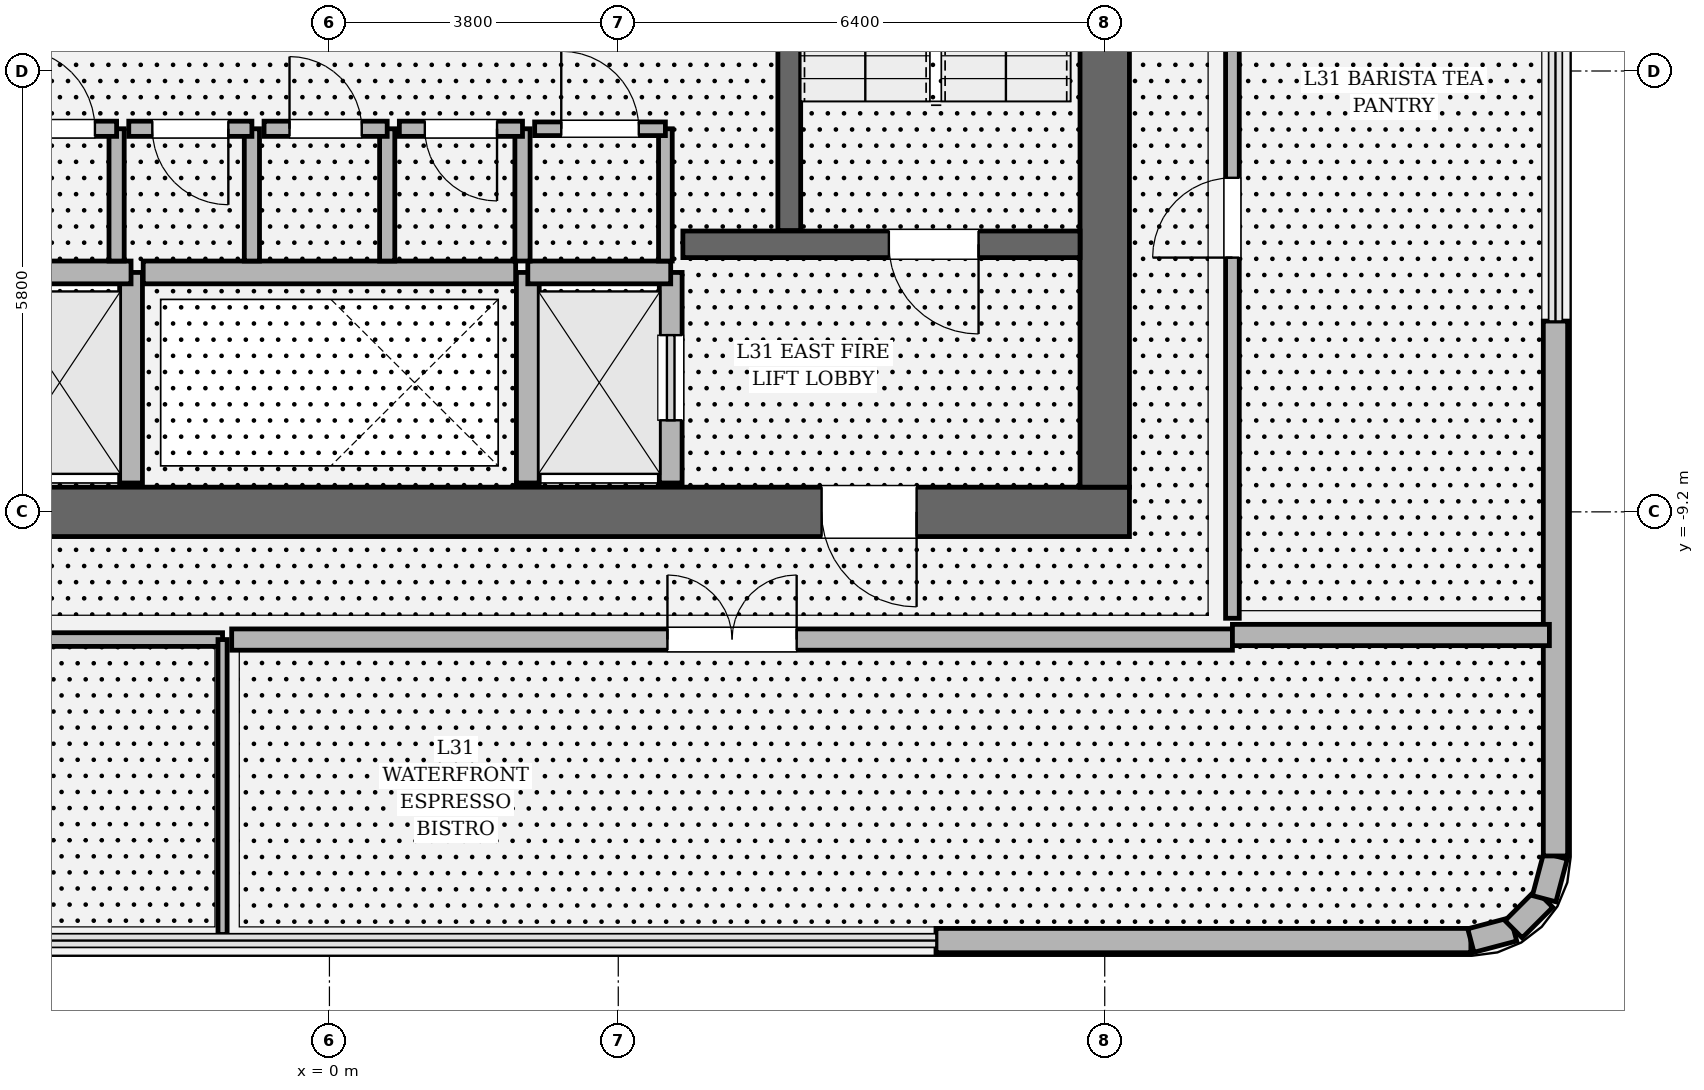
"""IFC4 building model, lengths in metres.
Left out: names, types, materials, properties, quantities, classifications, styles, units other than length and angle.
Written with IfcOpenShell. Run it as: python <this file> out.ifc"""

import sys

from ifc_helpers import new_model, si_unit, direction, frame, frame_2d, origin, place, context, subcontext, project, spatial, rectangle, extrude, element, fill, save


model = new_model("IFC4")
c1 = context("Model", 3, precision=1e-05, world=origin(), true_north=direction((0.0, 1.0)))
c2 = subcontext(c1, "Body", "Model", "MODEL_VIEW")
j1 = project(units=[si_unit("LENGTHUNIT", "METRE"), si_unit("PLANEANGLEUNIT", "RADIAN")], contexts=[c1])
p1 = place(None, origin())
s1 = spatial("IfcSite", under=j1, at=p1, CompositionType="ELEMENT")
p2 = place(p1, origin())
s2 = spatial("IfcBuilding", under=s1, at=p2, CompositionType="ELEMENT")
p3 = place(p2, frame((0.0, 0.0, 135.0)))
s3 = spatial("IfcBuildingStorey", under=s2, at=p3, CompositionType="ELEMENT", Elevation=135.0)
p4 = place(p3, frame((10.525, -9.2, 0.0), z_axis=(0.0, 0.0, 1.0), x_axis=(-1.0, 0.0, 0.0)))
e1 = element("IfcWall", 1, at=p4, inside=s3, PredefinedType="SHEAR", context=c2, shape_type="SweptSolid", body=[
    extrude(rectangle(XDim=21.05, YDim=0.65, at=frame_2d((10.525, 0.0))), origin(), (0.0, 0.0, 1.0), 4.8),
])
p5 = place(p4, frame((2.8, 0.0, 0.0)))
e2 = element("IfcOpeningElement", 2, at=p5, cuts=e1, PredefinedType="OPENING", context=c2, shape_type="SweptSolid", body=[
    extrude(rectangle(XDim=1.25, YDim=2.25, at=frame_2d((0.625, 1.125))), frame((0.0, 0.335, 0.0), z_axis=(0.0, -1.0, 0.0), x_axis=(1.0, 0.0, 0.0)), (0.0, 0.0, 1.0), 0.67),
])
p6 = place(p4, frame((17.0, 0.0, 0.0)))
e3 = element("IfcOpeningElement", 3, at=p6, cuts=e1, PredefinedType="OPENING", context=c2, shape_type="SweptSolid", body=[
    extrude(rectangle(XDim=1.25, YDim=2.25, at=frame_2d((0.625, 1.125))), frame((0.0, 0.335, 0.0), z_axis=(0.0, -1.0, 0.0), x_axis=(1.0, 0.0, 0.0)), (0.0, 0.0, 1.0), 0.67),
])
p7 = place(p3, frame((10.2, 8.875, 0.0), z_axis=(0.0, 0.0, 1.0), x_axis=(0.0, -1.0, 0.0)))
e4 = element("IfcWall", 4, at=p7, inside=s3, PredefinedType="SHEAR", context=c2, shape_type="SweptSolid", body=[
    extrude(rectangle(XDim=17.75, YDim=0.65, at=frame_2d((8.875, 0.0))), origin(), (0.0, 0.0, 1.0), 4.8),
])
p8 = place(p7, frame((3.905, 0.0, 0.0)))
e5 = element("IfcOpeningElement", 5, at=p8, cuts=e4, PredefinedType="OPENING", context=c2, shape_type="SweptSolid", body=[
    extrude(rectangle(XDim=1.18, YDim=2.2, at=frame_2d((0.59, 1.1))), frame((0.0, 0.335, 0.0), z_axis=(0.0, -1.0, 0.0), x_axis=(1.0, 0.0, 0.0)), (0.0, 0.0, 1.0), 0.67),
])
p9 = place(p3, frame((6.05, 3.45, 0.0), z_axis=(0.0, 0.0, 1.0), x_axis=(0.0, -1.0, 0.0)))
e6 = element("IfcWall", 6, at=p9, inside=s3, PredefinedType="SOLIDWALL", context=c2, shape_type="SweptSolid", body=[
    extrude(rectangle(XDim=8.95, YDim=0.3, at=frame_2d((4.475, 0.0))), origin(), (0.0, 0.0, 1.0), 4.8),
])
p10 = place(p3, frame((4.65, -5.68, 0.0), z_axis=(0.0, 0.0, 1.0), x_axis=(1.0, 0.0, 0.0)))
e7 = element("IfcWall", 7, at=p10, inside=s3, PredefinedType="SOLIDWALL", context=c2, shape_type="SweptSolid", body=[
    extrude(rectangle(XDim=5.225, YDim=0.35, at=frame_2d((2.613, 0.0))), origin(), (0.0, 0.0, 1.0), 4.8),
])
p11 = place(p10, frame((2.71, 0.0, 0.0)))
e8 = element("IfcOpeningElement", 8, at=p11, cuts=e7, PredefinedType="OPENING", context=c2, shape_type="SweptSolid", body=[
    extrude(rectangle(XDim=1.18, YDim=2.2, at=frame_2d((0.59, 1.1))), frame((0.0, 0.185, 0.0), z_axis=(0.0, -1.0, 0.0), x_axis=(1.0, 0.0, 0.0)), (0.0, 0.0, 1.0), 0.37),
])
p12 = place(p3, frame((7.98, -14.84, 0.0), z_axis=(0.0, 0.0, 1.0), x_axis=(1.0, 0.0, 0.0)))
e9 = element("IfcWall", 9, at=p12, inside=s3, PredefinedType="SOLIDWALL", context=c2, shape_type="SweptSolid", body=[
    extrude(rectangle(XDim=7.037, YDim=0.32, at=frame_2d((3.519, 0.0))), origin(), (0.0, 0.0, 1.0), 3.194),
])
p13 = place(p3, frame((15.017, -14.84, 0.0), z_axis=(0.0, 0.0, 1.0), x_axis=(0.966665515501, 0.256042537758, 0.0)))
e10 = element("IfcWall", 10, at=p13, inside=s3, PredefinedType="SOLIDWALL", context=c2, shape_type="SweptSolid", body=[
    extrude(rectangle(XDim=0.582, YDim=0.32, at=frame_2d((0.291, 0.0))), origin(), (0.0, 0.0, 1.0), 4.52),
])
p14 = place(p3, frame((15.579, -14.691, 0.0), z_axis=(0.0, 0.0, 1.0), x_axis=(0.707106781187, 0.707106781187, 0.0)))
e11 = element("IfcWall", 11, at=p14, inside=s3, PredefinedType="SOLIDWALL", context=c2, shape_type="SweptSolid", body=[
    extrude(rectangle(XDim=0.569, YDim=0.32, at=frame_2d((0.284, 0.0))), origin(), (0.0, 0.0, 1.0), 4.52),
])
p15 = place(p3, frame((15.981, -14.289, 0.0), z_axis=(0.0, 0.0, 1.0), x_axis=(0.255650250031, 0.966769336325, 0.0)))
e12 = element("IfcWall", 12, at=p15, inside=s3, PredefinedType="SOLIDWALL", context=c2, shape_type="SweptSolid", body=[
    extrude(rectangle(XDim=0.582, YDim=0.32, at=frame_2d((0.291, 0.0))), origin(), (0.0, 0.0, 1.0), 4.52),
])
p16 = place(p3, frame((16.13, -13.727, 0.0), z_axis=(0.0, 0.0, 1.0), x_axis=(0.0, 1.0, 0.0)))
e13 = element("IfcWall", 13, at=p16, inside=s3, PredefinedType="SOLIDWALL", context=c2, shape_type="SweptSolid", body=[
    extrude(rectangle(XDim=7.037, YDim=0.32, at=frame_2d((3.519, 0.0))), origin(), (0.0, 0.0, 1.0), 3.194),
])
p17 = place(p3, frame((-2.61, -8.82, 0.0), z_axis=(0.0, 0.0, 1.0), x_axis=(0.0, 1.0, 0.0)))
e14 = element("IfcWall", 14, at=p17, inside=s3, PredefinedType="SOLIDWALL", context=c2, shape_type="SweptSolid", body=[
    extrude(rectangle(XDim=2.77, YDim=0.3, at=frame_2d((1.385, 0.0))), origin(), (0.0, 0.0, 1.0), 4.52),
])
p18 = place(p3, frame((-4.49, -6.05, 0.0), z_axis=(0.0, 0.0, 1.0), x_axis=(1.0, 0.0, 0.0)))
e15 = element("IfcWall", 15, at=p18, inside=s3, PredefinedType="SOLIDWALL", context=c2, shape_type="SweptSolid", body=[
    extrude(rectangle(XDim=1.88, YDim=0.3, at=frame_2d((0.94, 0.0))), origin(), (0.0, 0.0, 1.0), 4.52),
])
p19 = place(p3, frame((4.49, -8.82, 0.0), z_axis=(0.0, 0.0, 1.0), x_axis=(0.0, 1.0, 0.0)))
e16 = element("IfcWall", 16, at=p19, inside=s3, PredefinedType="SOLIDWALL", context=c2, shape_type="SweptSolid", body=[
    extrude(rectangle(XDim=2.77, YDim=0.3, at=frame_2d((1.385, 0.0))), origin(), (0.0, 0.0, 1.0), 4.52),
])
p20 = place(p19, frame((0.825, 0.0, 0.0)))
e17 = element("IfcOpeningElement", 17, at=p20, cuts=e16, PredefinedType="OPENING", context=c2, shape_type="SweptSolid", body=[
    extrude(rectangle(XDim=1.12, YDim=2.25, at=frame_2d((0.56, 1.125))), frame((0.0, 0.16, 0.0), z_axis=(0.0, -1.0, 0.0), x_axis=(1.0, 0.0, 0.0)), (0.0, 0.0, 1.0), 0.32),
])
p21 = place(p3, frame((2.61, -8.82, 0.0), z_axis=(0.0, 0.0, 1.0), x_axis=(0.0, 1.0, 0.0)))
e18 = element("IfcWall", 18, at=p21, inside=s3, PredefinedType="SOLIDWALL", context=c2, shape_type="SweptSolid", body=[
    extrude(rectangle(XDim=2.77, YDim=0.3, at=frame_2d((1.385, 0.0))), origin(), (0.0, 0.0, 1.0), 4.52),
])
p22 = place(p3, frame((2.61, -6.05, 0.0), z_axis=(0.0, 0.0, 1.0), x_axis=(1.0, 0.0, 0.0)))
e19 = element("IfcWall", 19, at=p22, inside=s3, PredefinedType="SOLIDWALL", context=c2, shape_type="SweptSolid", body=[
    extrude(rectangle(XDim=1.88, YDim=0.3, at=frame_2d((0.94, 0.0))), origin(), (0.0, 0.0, 1.0), 4.52),
])
p23 = place(p3, frame((-2.45, -6.05, 0.0), z_axis=(0.0, 0.0, 1.0), x_axis=(1.0, 0.0, 0.0)))
e20 = element("IfcWall", 20, at=p23, inside=s3, PredefinedType="SOLIDWALL", context=c2, shape_type="SweptSolid", body=[
    extrude(rectangle(XDim=4.9, YDim=0.3, at=frame_2d((2.45, 0.0))), origin(), (0.0, 0.0, 1.0), 4.52),
])
p24 = place(p3, frame((-2.8, -5.9, 0.0), z_axis=(0.0, 0.0, 1.0), x_axis=(0.0, 1.0, 0.0)))
e21 = element("IfcWall", 21, at=p24, inside=s3, PredefinedType="SOLIDWALL", context=c2, shape_type="SweptSolid", body=[
    extrude(rectangle(XDim=1.74, YDim=0.2, at=frame_2d((0.87, 0.0))), origin(), (0.0, 0.0, 1.0), 4.52),
])
p25 = place(p3, frame((-2.8, -4.16, 0.0), z_axis=(0.0, 0.0, 1.0), x_axis=(-1.0, 0.0, 0.0)))
e22 = element("IfcWall", 22, at=p25, inside=s3, PredefinedType="SOLIDWALL", context=c2, shape_type="SweptSolid", body=[
    extrude(rectangle(XDim=1.62, YDim=0.2, at=frame_2d((0.81, 0.0))), origin(), (0.0, 0.0, 1.0), 4.52),
])
p26 = place(p25, frame((0.285, 0.0, 0.0)))
e23 = element("IfcOpeningElement", 23, at=p26, cuts=e22, PredefinedType="OPENING", context=c2, shape_type="SweptSolid", body=[
    extrude(rectangle(XDim=1.05, YDim=2.2, at=frame_2d((0.525, 1.1))), frame((0.0, 0.11, 0.0), z_axis=(0.0, -1.0, 0.0), x_axis=(1.0, 0.0, 0.0)), (0.0, 0.0, 1.0), 0.22),
])
p27 = place(p3, frame((-1.02, -5.9, 0.0), z_axis=(0.0, 0.0, 1.0), x_axis=(0.0, 1.0, 0.0)))
e24 = element("IfcWall", 24, at=p27, inside=s3, PredefinedType="SOLIDWALL", context=c2, shape_type="SweptSolid", body=[
    extrude(rectangle(XDim=1.74, YDim=0.2, at=frame_2d((0.87, 0.0))), origin(), (0.0, 0.0, 1.0), 4.52),
])
p28 = place(p3, frame((-1.02, -4.16, 0.0), z_axis=(0.0, 0.0, 1.0), x_axis=(-1.0, 0.0, 0.0)))
e25 = element("IfcWall", 25, at=p28, inside=s3, PredefinedType="SOLIDWALL", context=c2, shape_type="SweptSolid", body=[
    extrude(rectangle(XDim=1.62, YDim=0.2, at=frame_2d((0.81, 0.0))), origin(), (0.0, 0.0, 1.0), 4.52),
])
p29 = place(p28, frame((0.31, 0.0, 0.0)))
e26 = element("IfcOpeningElement", 26, at=p29, cuts=e25, PredefinedType="OPENING", context=c2, shape_type="SweptSolid", body=[
    extrude(rectangle(XDim=1.0, YDim=2.15, at=frame_2d((0.5, 1.075))), frame((0.0, 0.11, 0.0), z_axis=(0.0, -1.0, 0.0), x_axis=(1.0, 0.0, 0.0)), (0.0, 0.0, 1.0), 0.22),
])
p30 = place(p3, frame((0.76, -5.9, 0.0), z_axis=(0.0, 0.0, 1.0), x_axis=(0.0, 1.0, 0.0)))
e27 = element("IfcWall", 27, at=p30, inside=s3, PredefinedType="SOLIDWALL", context=c2, shape_type="SweptSolid", body=[
    extrude(rectangle(XDim=1.74, YDim=0.2, at=frame_2d((0.87, 0.0))), origin(), (0.0, 0.0, 1.0), 4.52),
])
p31 = place(p3, frame((0.76, -4.16, 0.0), z_axis=(0.0, 0.0, 1.0), x_axis=(-1.0, 0.0, 0.0)))
e28 = element("IfcWall", 28, at=p31, inside=s3, PredefinedType="SOLIDWALL", context=c2, shape_type="SweptSolid", body=[
    extrude(rectangle(XDim=1.62, YDim=0.2, at=frame_2d((0.81, 0.0))), origin(), (0.0, 0.0, 1.0), 4.52),
])
p32 = place(p31, frame((0.335, 0.0, 0.0)))
e29 = element("IfcOpeningElement", 29, at=p32, cuts=e28, PredefinedType="OPENING", context=c2, shape_type="SweptSolid", body=[
    extrude(rectangle(XDim=0.95, YDim=2.15, at=frame_2d((0.475, 1.075))), frame((0.0, 0.11, 0.0), z_axis=(0.0, -1.0, 0.0), x_axis=(1.0, 0.0, 0.0)), (0.0, 0.0, 1.0), 0.22),
])
p33 = place(p3, frame((2.54, -5.9, 0.0), z_axis=(0.0, 0.0, 1.0), x_axis=(0.0, 1.0, 0.0)))
e30 = element("IfcWall", 30, at=p33, inside=s3, PredefinedType="SOLIDWALL", context=c2, shape_type="SweptSolid", body=[
    extrude(rectangle(XDim=1.74, YDim=0.2, at=frame_2d((0.87, 0.0))), origin(), (0.0, 0.0, 1.0), 4.52),
])
p34 = place(p3, frame((2.54, -4.16, 0.0), z_axis=(0.0, 0.0, 1.0), x_axis=(-1.0, 0.0, 0.0)))
e31 = element("IfcWall", 31, at=p34, inside=s3, PredefinedType="SOLIDWALL", context=c2, shape_type="SweptSolid", body=[
    extrude(rectangle(XDim=1.62, YDim=0.2, at=frame_2d((0.81, 0.0))), origin(), (0.0, 0.0, 1.0), 4.52),
])
p35 = place(p34, frame((0.335, 0.0, 0.0)))
e32 = element("IfcOpeningElement", 32, at=p35, cuts=e31, PredefinedType="OPENING", context=c2, shape_type="SweptSolid", body=[
    extrude(rectangle(XDim=0.95, YDim=2.15, at=frame_2d((0.475, 1.075))), frame((0.0, 0.11, 0.0), z_axis=(0.0, -1.0, 0.0), x_axis=(1.0, 0.0, 0.0)), (0.0, 0.0, 1.0), 0.22),
])
p36 = place(p3, frame((4.42, -5.9, 0.0), z_axis=(0.0, 0.0, 1.0), x_axis=(0.0, 1.0, 0.0)))
e33 = element("IfcWall", 33, at=p36, inside=s3, PredefinedType="PARTITIONING", context=c2, shape_type="SweptSolid", body=[
    extrude(rectangle(XDim=1.74, YDim=0.18, at=frame_2d((0.87, 0.0))), origin(), (0.0, 0.0, 1.0), 4.52),
])
p37 = place(p3, frame((4.42, -4.16, 0.0), z_axis=(0.0, 0.0, 1.0), x_axis=(-1.0, 0.0, 0.0)))
e34 = element("IfcWall", 34, at=p37, inside=s3, PredefinedType="PARTITIONING", context=c2, shape_type="SweptSolid", body=[
    extrude(rectangle(XDim=1.72, YDim=0.18, at=frame_2d((0.86, 0.0))), origin(), (0.0, 0.0, 1.0), 4.52),
])
p38 = place(p37, frame((0.35, 0.0, 0.0)))
e35 = element("IfcOpeningElement", 35, at=p38, cuts=e34, PredefinedType="OPENING", context=c2, shape_type="SweptSolid", body=[
    extrude(rectangle(XDim=1.02, YDim=2.2, at=frame_2d((0.51, 1.1))), frame((0.0, 0.1, 0.0), z_axis=(0.0, -1.0, 0.0), x_axis=(1.0, 0.0, 0.0)), (0.0, 0.0, 1.0), 0.2),
])
p39 = place(p3, frame((-11.88, -10.88, 0.0), z_axis=(0.0, 0.0, 1.0), x_axis=(1.0, 0.0, 0.0)))
e36 = element("IfcWall", 36, at=p39, inside=s3, PredefinedType="PARTITIONING", context=c2, shape_type="SweptSolid", body=[
    extrude(rectangle(XDim=10.474, YDim=0.18, at=frame_2d((5.237, 0.0))), origin(), (0.0, 0.0, 1.0), 3.194),
])
p40 = place(p39, frame((4.712, 0.0, 0.0)))
e37 = element("IfcOpeningElement", 37, at=p40, cuts=e36, PredefinedType="OPENING", context=c2, shape_type="SweptSolid", body=[
    extrude(rectangle(XDim=1.05, YDim=2.2, at=frame_2d((0.525, 1.1))), frame((0.0, 0.1, 0.0), z_axis=(0.0, -1.0, 0.0), x_axis=(1.0, 0.0, 0.0)), (0.0, 0.0, 1.0), 0.2),
])
p41 = place(p3, frame((-1.406, -10.88, 0.0), z_axis=(0.0, 0.0, 1.0), x_axis=(0.0, -1.0, 0.0)))
e38 = element("IfcWall", 38, at=p41, inside=s3, PredefinedType="PARTITIONING", context=c2, shape_type="SweptSolid", body=[
    extrude(rectangle(XDim=3.88, YDim=0.12, at=frame_2d((1.94, 0.0))), origin(), (0.0, 0.0, 1.0), 4.52),
])
p42 = place(p3, frame((-1.286, -10.88, 0.0), z_axis=(0.0, 0.0, 1.0), x_axis=(1.0, 0.0, 0.0)))
e39 = element("IfcWall", 39, at=p42, inside=s3, PredefinedType="SOLIDWALL", context=c2, shape_type="SweptSolid", body=[
    extrude(rectangle(XDim=13.166, YDim=0.28, at=frame_2d((6.583, 0.0))), origin(), (0.0, 0.0, 1.0), 3.194),
])
p43 = place(p42, frame((5.733, 0.0, 0.0)))
e40 = element("IfcOpeningElement", 40, at=p43, cuts=e39, PredefinedType="OPENING", context=c2, shape_type="SweptSolid", body=[
    extrude(rectangle(XDim=1.7, YDim=2.3, at=frame_2d((0.85, 1.15))), frame((0.0, 0.15, 0.0), z_axis=(0.0, -1.0, 0.0), x_axis=(1.0, 0.0, 0.0)), (0.0, 0.0, 1.0), 0.3),
])
p44 = place(p3, frame((11.88, -10.82, 0.0), z_axis=(0.0, 0.0, 1.0), x_axis=(1.0, 0.0, 0.0)))
e41 = element("IfcWall", 41, at=p44, inside=s3, PredefinedType="SOLIDWALL", context=c2, shape_type="SweptSolid", body=[
    extrude(rectangle(XDim=4.17, YDim=0.28, at=frame_2d((2.085, 0.0))), origin(), (0.0, 0.0, 1.0), 4.114),
])
p45 = place(p3, frame((11.88, -10.6, 0.0), z_axis=(0.0, 0.0, 1.0), x_axis=(0.0, 1.0, 0.0)))
e42 = element("IfcWall", 42, at=p45, inside=s3, PredefinedType="PARTITIONING", context=c2, shape_type="SweptSolid", body=[
    extrude(rectangle(XDim=10.54, YDim=0.18, at=frame_2d((5.27, 0.0))), origin(), (0.0, 0.0, 1.0), 3.194),
])
p46 = place(p45, frame((4.745, 0.0, 0.0)))
e43 = element("IfcOpeningElement", 43, at=p46, cuts=e42, PredefinedType="OPENING", context=c2, shape_type="SweptSolid", body=[
    extrude(rectangle(XDim=1.05, YDim=2.2, at=frame_2d((0.525, 1.1))), frame((0.0, 0.1, 0.0), z_axis=(0.0, -1.0, 0.0), x_axis=(1.0, 0.0, 0.0)), (0.0, 0.0, 1.0), 0.2),
])
p47 = place(p11, origin())
e44 = element("IfcDoor", 44, at=p47, inside=s3, OperationType="SINGLE_SWING_RIGHT", PredefinedType="DOOR", context=c2, shape_type="SweptSolid", body=[
    extrude(rectangle(XDim=1.18, YDim=2.2, at=frame_2d((0.59, 1.1))), frame((0.0, 0.025, 0.0), z_axis=(0.0, -1.0, 0.0), x_axis=(1.0, 0.0, 0.0)), (0.0, 0.0, 1.0), 0.05),
])
fill(e8, e44)
p48 = place(p5, origin())
e45 = element("IfcDoor", 45, at=p48, inside=s3, OperationType="SINGLE_SWING_LEFT", PredefinedType="DOOR", context=c2, shape_type="SweptSolid", body=[
    extrude(rectangle(XDim=1.25, YDim=2.25, at=frame_2d((0.625, 1.125))), frame((0.0, 0.025, 0.0), z_axis=(0.0, -1.0, 0.0), x_axis=(1.0, 0.0, 0.0)), (0.0, 0.0, 1.0), 0.05),
])
fill(e2, e45)
p49 = place(p20, origin())
e46 = element("IfcDoor", 46, at=p49, inside=s3, OperationType="SLIDING_TO_RIGHT", PredefinedType="DOOR", context=c2, shape_type="SweptSolid", body=[
    extrude(rectangle(XDim=1.12, YDim=2.25, at=frame_2d((0.56, 1.125))), frame((0.0, 0.025, 0.0), z_axis=(0.0, -1.0, 0.0), x_axis=(1.0, 0.0, 0.0)), (0.0, 0.0, 1.0), 0.05),
])
fill(e17, e46)
p50 = place(p26, origin())
e47 = element("IfcDoor", 47, at=p50, inside=s3, OperationType="SINGLE_SWING_RIGHT", PredefinedType="DOOR", context=c2, shape_type="SweptSolid", body=[
    extrude(rectangle(XDim=1.05, YDim=2.2, at=frame_2d((0.525, 1.1))), frame((0.0, 0.025, 0.0), z_axis=(0.0, -1.0, 0.0), x_axis=(1.0, 0.0, 0.0)), (0.0, 0.0, 1.0), 0.05),
])
fill(e23, e47)
p51 = place(p29, origin())
e48 = element("IfcDoor", 48, at=p51, inside=s3, OperationType="SINGLE_SWING_LEFT", PredefinedType="DOOR", context=c2, shape_type="SweptSolid", body=[
    extrude(rectangle(XDim=1.0, YDim=2.15, at=frame_2d((0.5, 1.075))), frame((0.0, 0.025, 0.0), z_axis=(0.0, -1.0, 0.0), x_axis=(1.0, 0.0, 0.0)), (0.0, 0.0, 1.0), 0.05),
])
fill(e26, e48)
p52 = place(p32, origin())
e49 = element("IfcDoor", 49, at=p52, inside=s3, OperationType="SINGLE_SWING_RIGHT", PredefinedType="DOOR", context=c2, shape_type="SweptSolid", body=[
    extrude(rectangle(XDim=0.95, YDim=2.15, at=frame_2d((0.475, 1.075))), frame((0.0, 0.025, 0.0), z_axis=(0.0, -1.0, 0.0), x_axis=(1.0, 0.0, 0.0)), (0.0, 0.0, 1.0), 0.05),
])
fill(e29, e49)
p53 = place(p35, origin())
e50 = element("IfcDoor", 50, at=p53, inside=s3, OperationType="SINGLE_SWING_LEFT", PredefinedType="DOOR", context=c2, shape_type="SweptSolid", body=[
    extrude(rectangle(XDim=0.95, YDim=2.15, at=frame_2d((0.475, 1.075))), frame((0.0, 0.025, 0.0), z_axis=(0.0, -1.0, 0.0), x_axis=(1.0, 0.0, 0.0)), (0.0, 0.0, 1.0), 0.05),
])
fill(e32, e50)
p54 = place(p38, origin())
e51 = element("IfcDoor", 51, at=p54, inside=s3, OperationType="SINGLE_SWING_RIGHT", PredefinedType="DOOR", context=c2, shape_type="SweptSolid", body=[
    extrude(rectangle(XDim=1.02, YDim=2.2, at=frame_2d((0.51, 1.1))), frame((0.0, 0.025, 0.0), z_axis=(0.0, -1.0, 0.0), x_axis=(1.0, 0.0, 0.0)), (0.0, 0.0, 1.0), 0.05),
])
fill(e35, e51)
p55 = place(p43, origin())
e52 = element("IfcDoor", 52, at=p55, inside=s3, OperationType="DOUBLE_DOOR_SINGLE_SWING", PredefinedType="DOOR", context=c2, shape_type="SweptSolid", body=[
    extrude(rectangle(XDim=1.7, YDim=2.3, at=frame_2d((0.85, 1.15))), frame((0.0, 0.025, 0.0), z_axis=(0.0, -1.0, 0.0), x_axis=(1.0, 0.0, 0.0)), (0.0, 0.0, 1.0), 0.05),
])
fill(e40, e52)
p56 = place(p46, origin())
e53 = element("IfcDoor", 53, at=p56, inside=s3, OperationType="SINGLE_SWING_LEFT", PredefinedType="DOOR", context=c2, shape_type="SweptSolid", body=[
    extrude(rectangle(XDim=1.05, YDim=2.2, at=frame_2d((0.525, 1.1))), frame((0.0, 0.025, 0.0), z_axis=(0.0, -1.0, 0.0), x_axis=(1.0, 0.0, 0.0)), (0.0, 0.0, 1.0), 0.05),
])
fill(e43, e53)
save(model, sys.argv[1])
